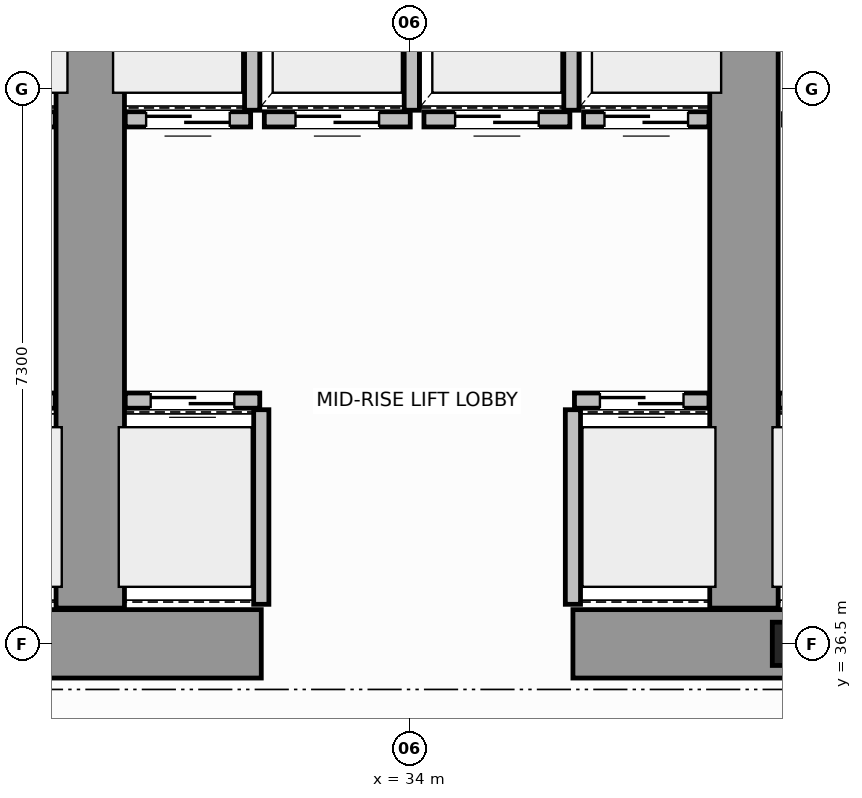
"""IFC4 building model, lengths in metres.
Left out: names, types, materials, properties, quantities, classifications, styles, units other than length and angle.
Written with IfcOpenShell. Run it as: python <this file> out.ifc"""

import sys

from ifc_helpers import new_model, si_unit, direction, frame, frame_2d, origin, origin_2d, place, context, subcontext, project, spatial, rectangle, i_section, extrude, source, transform, mapped, element, fill, save


model = new_model("IFC4")
c1 = context("Model", 3, precision=1e-05, world=origin(), true_north=direction((0.0, 1.0)))
c2 = subcontext(c1, "Body", "Model", "MODEL_VIEW")
j1 = project(units=[si_unit("LENGTHUNIT", "METRE"), si_unit("PLANEANGLEUNIT", "RADIAN")], contexts=[c1])
p1 = place(None, origin())
s1 = spatial("IfcSite", under=j1, at=p1, CompositionType="ELEMENT")
p2 = place(p1, origin())
s2 = spatial("IfcBuilding", under=s1, at=p2, CompositionType="ELEMENT")
p3 = place(p2, frame((0.0, 0.0, 5.6)))
s3 = spatial("IfcBuildingStorey", under=s2, at=p3, CompositionType="ELEMENT", Elevation=5.6)
m1 = source(origin(), c2, "Body", "SweptSolid", [
    extrude(i_section(OverallWidth=0.454, OverallDepth=0.569, WebThickness=0.078, FlangeThickness=0.08, FilletRadius=0.015, at=origin_2d()), origin(), (0.0, 0.0, 1.0), 4.4),
])
p4 = place(p3, frame((39.0, 36.5, 0.0), z_axis=(0.0, 0.0, 1.0), x_axis=(1.0, 0.0, 0.0)))
e1 = element("IfcColumn", 1, at=p4, inside=s3, PredefinedType="COLUMN", context=c2, shape_type="MappedRepresentation", body=[
    mapped(m1, transform((0.0, 0.0, 0.0), scale=1.0)),
])
for number, where, z_axis, x_axis in (
    (2, (27.55, 36.5, 0.0), (0.0, 0.0, 1.0), (1.0, 0.0, 0.0)),
    (3, (36.15, 36.5, 0.0), (0.0, 0.0, 1.0), (1.0, 0.0, 0.0)),
):
    element("IfcWall", number, at=place(p3, frame(where, z_axis=z_axis, x_axis=x_axis)), inside=s3, PredefinedType="SHEAR", context=c2, shape_type="SweptSolid", body=[
        extrude(rectangle(XDim=4.5, YDim=0.9, at=frame_2d((2.25, 0.0))), origin(), (0.0, 0.0, 1.0), 4.4),
    ])
for number, where, z_axis, x_axis in (
    (4, (29.8, 36.97, 0.0), (0.0, 0.0, 1.0), (0.0, 1.0, 0.0)),
    (5, (38.4, 36.97, 0.0), (0.0, 0.0, 1.0), (0.0, 1.0, 0.0)),
):
    element("IfcWall", number, at=place(p3, frame(where, z_axis=z_axis, x_axis=x_axis)), inside=s3, PredefinedType="SHEAR", context=c2, shape_type="SweptSolid", body=[
        extrude(rectangle(XDim=9.23, YDim=0.9, at=frame_2d((4.615, 0.0))), origin(), (0.0, 0.0, 1.0), 4.4),
    ])
p5 = place(p3, frame((27.57, 39.7, 0.0), z_axis=(0.0, 0.0, 1.0), x_axis=(1.0, 0.0, 0.0)))
e6 = element("IfcWall", 6, at=p5, inside=s3, PredefinedType="SOLIDWALL", context=c2, shape_type="SweptSolid", body=[
    extrude(rectangle(XDim=1.77, YDim=0.2, at=frame_2d((0.885, 0.0))), origin(), (0.0, 0.0, 1.0), 4.12),
])
p6 = place(p5, frame((0.335, 0.0, 0.0)))
e7 = element("IfcOpeningElement", 7, at=p6, cuts=e6, PredefinedType="OPENING", context=c2, shape_type="SweptSolid", body=[
    extrude(rectangle(XDim=1.1, YDim=2.15, at=frame_2d((0.55, 1.075))), frame((0.0, 0.11, 0.0), z_axis=(0.0, -1.0, 0.0), x_axis=(1.0, 0.0, 0.0)), (0.0, 0.0, 1.0), 0.22),
])
p7 = place(p3, frame((27.69, 43.4, 0.0), z_axis=(0.0, 0.0, 1.0), x_axis=(1.0, 0.0, 0.0)))
e8 = element("IfcWall", 8, at=p7, inside=s3, PredefinedType="SOLIDWALL", context=c2, shape_type="SweptSolid", body=[
    extrude(rectangle(XDim=1.65, YDim=0.2, at=frame_2d((0.825, 0.0))), origin(), (0.0, 0.0, 1.0), 4.12),
])
p8 = place(p7, frame((0.275, 0.0, 0.0)))
e9 = element("IfcOpeningElement", 9, at=p8, cuts=e8, PredefinedType="OPENING", context=c2, shape_type="SweptSolid", body=[
    extrude(rectangle(XDim=1.1, YDim=2.15, at=frame_2d((0.55, 1.075))), frame((0.0, 0.11, 0.0), z_axis=(0.0, -1.0, 0.0), x_axis=(1.0, 0.0, 0.0)), (0.0, 0.0, 1.0), 0.22),
])
p9 = place(p3, frame((30.26, 39.7, 0.0), z_axis=(0.0, 0.0, 1.0), x_axis=(1.0, 0.0, 0.0)))
e10 = element("IfcWall", 10, at=p9, inside=s3, PredefinedType="SOLIDWALL", context=c2, shape_type="SweptSolid", body=[
    extrude(rectangle(XDim=1.77, YDim=0.2, at=frame_2d((0.885, 0.0))), origin(), (0.0, 0.0, 1.0), 4.12),
])
p10 = place(p9, frame((0.335, 0.0, 0.0)))
e11 = element("IfcOpeningElement", 11, at=p10, cuts=e10, PredefinedType="OPENING", context=c2, shape_type="SweptSolid", body=[
    extrude(rectangle(XDim=1.1, YDim=2.15, at=frame_2d((0.55, 1.075))), frame((0.0, 0.11, 0.0), z_axis=(0.0, -1.0, 0.0), x_axis=(1.0, 0.0, 0.0)), (0.0, 0.0, 1.0), 0.22),
])
p11 = place(p3, frame((32.05, 37.02, 0.0), z_axis=(0.0, 0.0, 1.0), x_axis=(0.0, 1.0, 0.0)))
e12 = element("IfcWall", 12, at=p11, inside=s3, PredefinedType="SOLIDWALL", context=c2, shape_type="SweptSolid", body=[
    extrude(rectangle(XDim=2.56, YDim=0.2, at=frame_2d((1.28, 0.0))), origin(), (0.0, 0.0, 1.0), 4.12),
])
p12 = place(p3, frame((36.17, 39.7, 0.0), z_axis=(0.0, 0.0, 1.0), x_axis=(1.0, 0.0, 0.0)))
e13 = element("IfcWall", 13, at=p12, inside=s3, PredefinedType="SOLIDWALL", context=c2, shape_type="SweptSolid", body=[
    extrude(rectangle(XDim=1.77, YDim=0.2, at=frame_2d((0.885, 0.0))), origin(), (0.0, 0.0, 1.0), 4.12),
])
p13 = place(p12, frame((0.335, 0.0, 0.0)))
e14 = element("IfcOpeningElement", 14, at=p13, cuts=e13, PredefinedType="OPENING", context=c2, shape_type="SweptSolid", body=[
    extrude(rectangle(XDim=1.1, YDim=2.15, at=frame_2d((0.55, 1.075))), frame((0.0, 0.11, 0.0), z_axis=(0.0, -1.0, 0.0), x_axis=(1.0, 0.0, 0.0)), (0.0, 0.0, 1.0), 0.22),
])
p14 = place(p3, frame((36.15, 37.02, 0.0), z_axis=(0.0, 0.0, 1.0), x_axis=(0.0, 1.0, 0.0)))
e15 = element("IfcWall", 15, at=p14, inside=s3, PredefinedType="SOLIDWALL", context=c2, shape_type="SweptSolid", body=[
    extrude(rectangle(XDim=2.56, YDim=0.2, at=frame_2d((1.28, 0.0))), origin(), (0.0, 0.0, 1.0), 4.12),
])
p15 = place(p3, frame((30.26, 43.4, 0.0), z_axis=(0.0, 0.0, 1.0), x_axis=(1.0, 0.0, 0.0)))
e16 = element("IfcWall", 16, at=p15, inside=s3, PredefinedType="SOLIDWALL", context=c2, shape_type="SweptSolid", body=[
    extrude(rectangle(XDim=1.65, YDim=0.2, at=frame_2d((0.825, 0.0))), origin(), (0.0, 0.0, 1.0), 4.12),
])
p16 = place(p15, frame((0.275, 0.0, 0.0)))
e17 = element("IfcOpeningElement", 17, at=p16, cuts=e16, PredefinedType="OPENING", context=c2, shape_type="SweptSolid", body=[
    extrude(rectangle(XDim=1.1, YDim=2.15, at=frame_2d((0.55, 1.075))), frame((0.0, 0.11, 0.0), z_axis=(0.0, -1.0, 0.0), x_axis=(1.0, 0.0, 0.0)), (0.0, 0.0, 1.0), 0.22),
])
p17 = place(p3, frame((31.93, 43.52, 0.0), z_axis=(0.0, 0.0, 1.0), x_axis=(0.0, 1.0, 0.0)))
e18 = element("IfcWall", 18, at=p17, inside=s3, PredefinedType="SOLIDWALL", context=c2, shape_type="SweptSolid", body=[
    extrude(rectangle(XDim=2.56, YDim=0.2, at=frame_2d((1.28, 0.0))), origin(), (0.0, 0.0, 1.0), 4.12),
])
p18 = place(p3, frame((32.09, 43.4, 0.0), z_axis=(0.0, 0.0, 1.0), x_axis=(1.0, 0.0, 0.0)))
e19 = element("IfcWall", 19, at=p18, inside=s3, PredefinedType="SOLIDWALL", context=c2, shape_type="SweptSolid", body=[
    extrude(rectangle(XDim=1.92, YDim=0.2, at=frame_2d((0.96, 0.0))), origin(), (0.0, 0.0, 1.0), 4.12),
])
p19 = place(p18, frame((0.41, 0.0, 0.0)))
e20 = element("IfcOpeningElement", 20, at=p19, cuts=e19, PredefinedType="OPENING", context=c2, shape_type="SweptSolid", body=[
    extrude(rectangle(XDim=1.1, YDim=2.15, at=frame_2d((0.55, 1.075))), frame((0.0, 0.11, 0.0), z_axis=(0.0, -1.0, 0.0), x_axis=(1.0, 0.0, 0.0)), (0.0, 0.0, 1.0), 0.22),
])
p20 = place(p3, frame((34.03, 43.52, 0.0), z_axis=(0.0, 0.0, 1.0), x_axis=(0.0, 1.0, 0.0)))
e21 = element("IfcWall", 21, at=p20, inside=s3, PredefinedType="SOLIDWALL", context=c2, shape_type="SweptSolid", body=[
    extrude(rectangle(XDim=2.56, YDim=0.2, at=frame_2d((1.28, 0.0))), origin(), (0.0, 0.0, 1.0), 4.12),
])
p21 = place(p3, frame((34.19, 43.4, 0.0), z_axis=(0.0, 0.0, 1.0), x_axis=(1.0, 0.0, 0.0)))
e22 = element("IfcWall", 22, at=p21, inside=s3, PredefinedType="SOLIDWALL", context=c2, shape_type="SweptSolid", body=[
    extrude(rectangle(XDim=1.92, YDim=0.2, at=frame_2d((0.96, 0.0))), origin(), (0.0, 0.0, 1.0), 4.12),
])
p22 = place(p21, frame((0.41, 0.0, 0.0)))
e23 = element("IfcOpeningElement", 23, at=p22, cuts=e22, PredefinedType="OPENING", context=c2, shape_type="SweptSolid", body=[
    extrude(rectangle(XDim=1.1, YDim=2.15, at=frame_2d((0.55, 1.075))), frame((0.0, 0.11, 0.0), z_axis=(0.0, -1.0, 0.0), x_axis=(1.0, 0.0, 0.0)), (0.0, 0.0, 1.0), 0.22),
])
p23 = place(p3, frame((36.13, 43.52, 0.0), z_axis=(0.0, 0.0, 1.0), x_axis=(0.0, 1.0, 0.0)))
e24 = element("IfcWall", 24, at=p23, inside=s3, PredefinedType="SOLIDWALL", context=c2, shape_type="SweptSolid", body=[
    extrude(rectangle(XDim=2.56, YDim=0.2, at=frame_2d((1.28, 0.0))), origin(), (0.0, 0.0, 1.0), 4.12),
])
p24 = place(p3, frame((36.29, 43.4, 0.0), z_axis=(0.0, 0.0, 1.0), x_axis=(1.0, 0.0, 0.0)))
e25 = element("IfcWall", 25, at=p24, inside=s3, PredefinedType="SOLIDWALL", context=c2, shape_type="SweptSolid", body=[
    extrude(rectangle(XDim=1.65, YDim=0.2, at=frame_2d((0.825, 0.0))), origin(), (0.0, 0.0, 1.0), 4.12),
])
p25 = place(p24, frame((0.275, 0.0, 0.0)))
e26 = element("IfcOpeningElement", 26, at=p25, cuts=e25, PredefinedType="OPENING", context=c2, shape_type="SweptSolid", body=[
    extrude(rectangle(XDim=1.1, YDim=2.15, at=frame_2d((0.55, 1.075))), frame((0.0, 0.11, 0.0), z_axis=(0.0, -1.0, 0.0), x_axis=(1.0, 0.0, 0.0)), (0.0, 0.0, 1.0), 0.22),
])
p26 = place(p3, frame((38.86, 39.7, 0.0), z_axis=(0.0, 0.0, 1.0), x_axis=(1.0, 0.0, 0.0)))
e27 = element("IfcWall", 27, at=p26, inside=s3, PredefinedType="SOLIDWALL", context=c2, shape_type="SweptSolid", body=[
    extrude(rectangle(XDim=1.77, YDim=0.2, at=frame_2d((0.885, 0.0))), origin(), (0.0, 0.0, 1.0), 4.12),
])
p27 = place(p26, frame((0.335, 0.0, 0.0)))
e28 = element("IfcOpeningElement", 28, at=p27, cuts=e27, PredefinedType="OPENING", context=c2, shape_type="SweptSolid", body=[
    extrude(rectangle(XDim=1.1, YDim=2.15, at=frame_2d((0.55, 1.075))), frame((0.0, 0.11, 0.0), z_axis=(0.0, -1.0, 0.0), x_axis=(1.0, 0.0, 0.0)), (0.0, 0.0, 1.0), 0.22),
])
m2 = source(origin(), c2, "Body", "SweptSolid", [
    extrude(rectangle(XDim=1.1, YDim=2.15, at=frame_2d((0.55, 1.075))), frame((0.0, 0.025, 0.0), z_axis=(0.0, -1.0, 0.0), x_axis=(1.0, 0.0, 0.0)), (0.0, 0.0, 1.0), 0.05),
])
p28 = place(p10, origin())
e29 = element("IfcDoor", 29, at=p28, inside=s3, OperationType="DOUBLE_DOOR_SLIDING", PredefinedType="DOOR", context=c2, shape_type="MappedRepresentation", body=[
    mapped(m2, transform((0.0, 0.0, 0.0), scale=1.0)),
])
fill(e11, e29)
p29 = place(p13, origin())
e30 = element("IfcDoor", 30, at=p29, inside=s3, OperationType="DOUBLE_DOOR_SLIDING", PredefinedType="DOOR", context=c2, shape_type="MappedRepresentation", body=[
    mapped(m2, transform((0.0, 0.0, 0.0), scale=1.0)),
])
fill(e14, e30)
p30 = place(p16, origin())
e31 = element("IfcDoor", 31, at=p30, inside=s3, OperationType="DOUBLE_DOOR_SLIDING", PredefinedType="DOOR", context=c2, shape_type="MappedRepresentation", body=[
    mapped(m2, transform((0.0, 0.0, 0.0), scale=1.0)),
])
fill(e17, e31)
p31 = place(p19, origin())
e32 = element("IfcDoor", 32, at=p31, inside=s3, OperationType="DOUBLE_DOOR_SLIDING", PredefinedType="DOOR", context=c2, shape_type="MappedRepresentation", body=[
    mapped(m2, transform((0.0, 0.0, 0.0), scale=1.0)),
])
fill(e20, e32)
p32 = place(p22, origin())
e33 = element("IfcDoor", 33, at=p32, inside=s3, OperationType="DOUBLE_DOOR_SLIDING", PredefinedType="DOOR", context=c2, shape_type="MappedRepresentation", body=[
    mapped(m2, transform((0.0, 0.0, 0.0), scale=1.0)),
])
fill(e23, e33)
p33 = place(p25, origin())
e34 = element("IfcDoor", 34, at=p33, inside=s3, OperationType="DOUBLE_DOOR_SLIDING", PredefinedType="DOOR", context=c2, shape_type="MappedRepresentation", body=[
    mapped(m2, transform((0.0, 0.0, 0.0), scale=1.0)),
])
fill(e26, e34)
save(model, sys.argv[1])
